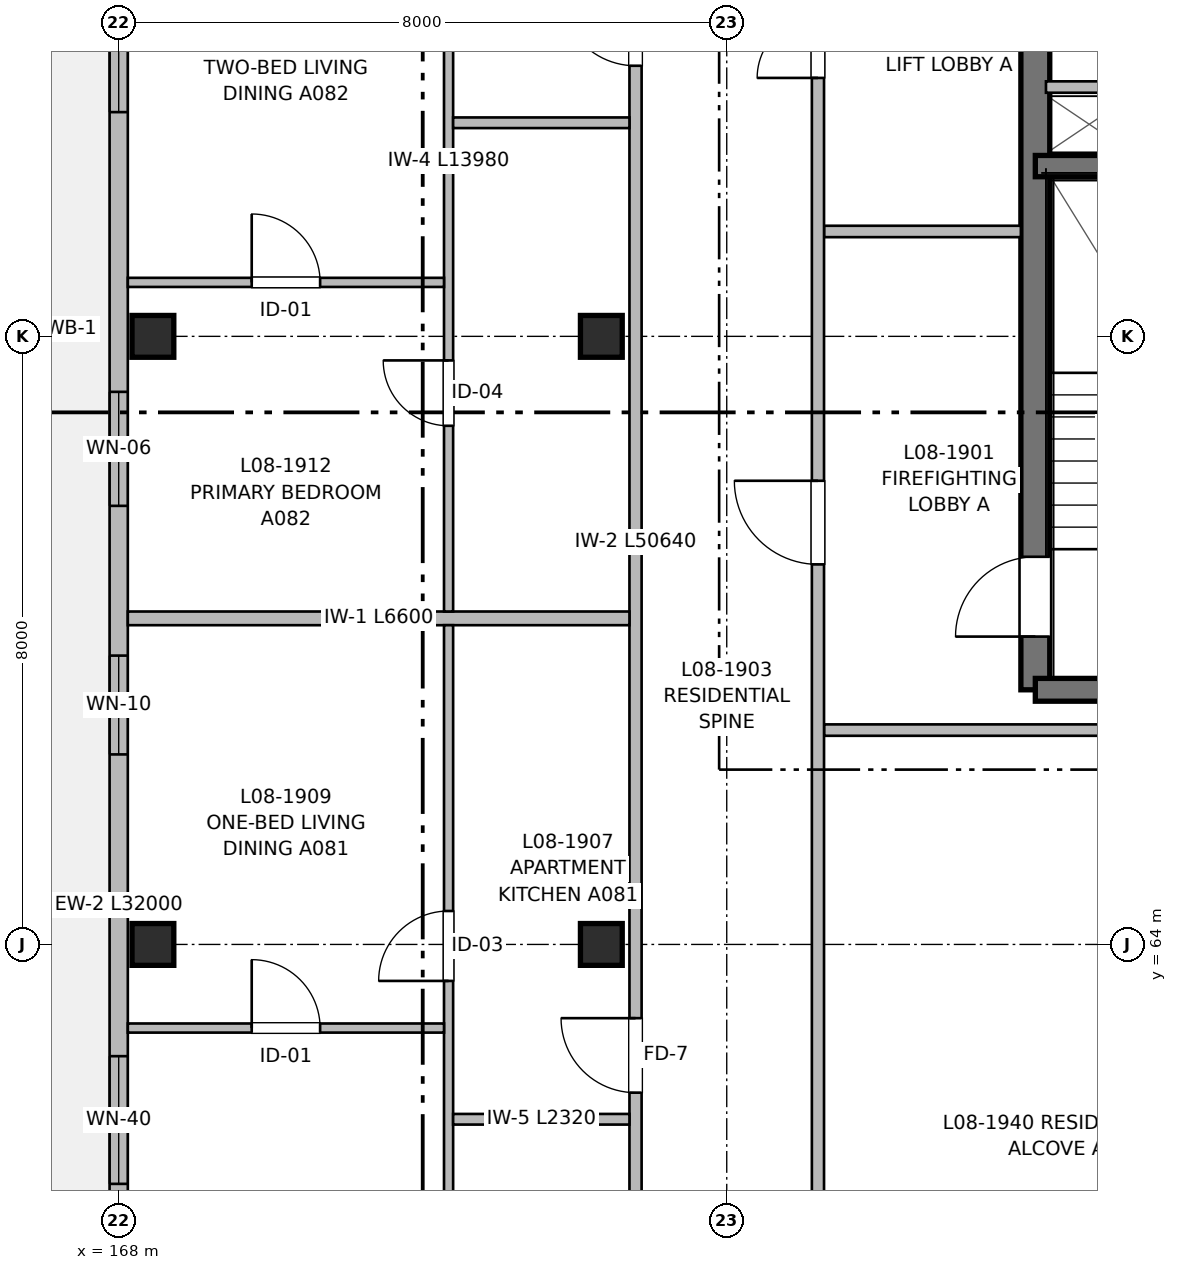
"""IFC4 building model, lengths in metres.
Left out: names, types, materials, properties, quantities, classifications, styles, units other than length and angle.
Written with IfcOpenShell. Run it as: python <this file> out.ifc"""

import sys

from ifc_helpers import new_model, si_unit, direction, frame, frame_2d, origin, origin_2d, place, context, subcontext, project, spatial, rectangle, extrude, element, fill, save


model = new_model("IFC4")
c1 = context("Model", 3, precision=1e-05, world=origin(), true_north=direction((0.0, 1.0)))
c2 = subcontext(c1, "Body", "Model", "MODEL_VIEW")
j1 = project(units=[si_unit("LENGTHUNIT", "METRE"), si_unit("PLANEANGLEUNIT", "RADIAN")], contexts=[c1])
p1 = place(None, origin())
s1 = spatial("IfcSite", under=j1, at=p1, CompositionType="ELEMENT")
p2 = place(p1, origin())
s2 = spatial("IfcBuilding", under=s1, at=p2, CompositionType="ELEMENT")
p3 = place(p2, frame((0.0, 0.0, 26.56)))
s3 = spatial("IfcBuildingStorey", under=s2, at=p3, CompositionType="ELEMENT", Elevation=26.56)
for number, where, z_axis, x_axis in (
    (1, (168.45, 64.0, 0.0), (0.0, 0.0, 1.0), (1.0, 0.0, 0.0)),
    (2, (168.45, 72.0, 0.0), (0.0, 0.0, 1.0), (1.0, 0.0, 0.0)),
    (3, (174.35, 64.0, 0.0), (0.0, 0.0, 1.0), (1.0, 0.0, 0.0)),
    (4, (174.35, 72.0, 0.0), (0.0, 0.0, 1.0), (1.0, 0.0, 0.0)),
):
    element("IfcColumn", number, at=place(p3, frame(where, z_axis=z_axis, x_axis=x_axis)), inside=s3, PredefinedType="COLUMN", context=c2, shape_type="SweptSolid", body=[
        extrude(rectangle(XDim=0.55, YDim=0.55, at=origin_2d()), origin(), (0.0, 0.0, 1.0), 3.2),
    ])
p4 = place(p3, frame((180.06, 67.35, 0.0), z_axis=(0.0, 0.0, 1.0), x_axis=(0.0, 1.0, 0.0)))
e5 = element("IfcWall", 5, at=p4, inside=s3, PredefinedType="SHEAR", context=c2, shape_type="SweptSolid", body=[
    extrude(rectangle(XDim=13.15, YDim=0.38, at=frame_2d((6.575, 0.0))), origin(), (0.0, 0.0, 1.0), 3.2),
])
p5 = place(p4, frame((0.7, 0.0, 0.0)))
e6 = element("IfcOpeningElement", 6, at=p5, cuts=e5, PredefinedType="OPENING", context=c2, shape_type="SweptSolid", body=[
    extrude(rectangle(XDim=1.05, YDim=2.15, at=frame_2d((0.525, 1.075))), frame((0.0, 0.2, 0.0), z_axis=(0.0, -1.0, 0.0), x_axis=(1.0, 0.0, 0.0)), (0.0, 0.0, 1.0), 0.4),
])
p6 = place(p3, frame((183.47, 67.35, 0.0), z_axis=(0.0, 0.0, 1.0), x_axis=(-1.0, 0.0, 0.0)))
e7 = element("IfcWall", 7, at=p6, inside=s3, PredefinedType="SHEAR", context=c2, shape_type="SweptSolid", body=[
    extrude(rectangle(XDim=3.41, YDim=0.3, at=frame_2d((1.705, 0.0))), origin(), (0.0, 0.0, 1.0), 3.2),
])
p7 = place(p3, frame((180.06, 74.24, 0.0), z_axis=(0.0, 0.0, 1.0), x_axis=(1.0, 0.0, 0.0)))
e8 = element("IfcWall", 8, at=p7, inside=s3, PredefinedType="SHEAR", context=c2, shape_type="SweptSolid", body=[
    extrude(rectangle(XDim=3.41, YDim=0.28, at=frame_2d((1.705, 0.0))), origin(), (0.0, 0.0, 1.0), 3.2),
])
p8 = place(p3, frame((180.2, 75.28, 0.0), z_axis=(0.0, 0.0, 1.0), x_axis=(1.0, 0.0, 0.0)))
e9 = element("IfcWall", 9, at=p8, inside=s3, PredefinedType="PARTITIONING", context=c2, shape_type="SweptSolid", body=[
    extrude(rectangle(XDim=1.13, YDim=0.15, at=frame_2d((0.565, 0.0))), origin(), (0.0, 0.0, 1.0), 2.95),
])
p9 = place(p3, frame((168.0, 56.0, 0.0), z_axis=(0.0, 0.0, 1.0), x_axis=(0.0, 1.0, 0.0)))
e10 = element("IfcWall", 10, at=p9, inside=s3, PredefinedType="SOLIDWALL", context=c2, shape_type="SweptSolid", body=[
    extrude(rectangle(XDim=32.0, YDim=0.24, at=frame_2d((16.0, 0.0))), origin(), (0.0, 0.0, 1.0), 2.98),
])
p10 = place(p9, frame((3.4, 0.0, 0.0)))
e11 = element("IfcOpeningElement", 11, at=p10, cuts=e10, PredefinedType="OPENING", context=c2, shape_type="SweptSolid", body=[
    extrude(rectangle(XDim=1.2, YDim=2.2, at=frame_2d((0.6, 1.1))), frame((0.0, 0.13, 0.0), z_axis=(0.0, -1.0, 0.0), x_axis=(1.0, 0.0, 0.0)), (0.0, 0.0, 1.0), 0.26),
])
p11 = place(p9, frame((4.85, 0.0, 0.72)))
e12 = element("IfcOpeningElement", 12, at=p11, cuts=e10, PredefinedType="OPENING", context=c2, shape_type="SweptSolid", body=[
    extrude(rectangle(XDim=1.68, YDim=1.5, at=frame_2d((0.84, 0.75))), frame((0.0, 0.13, 0.0), z_axis=(0.0, -1.0, 0.0), x_axis=(1.0, 0.0, 0.0)), (0.0, 0.0, 1.0), 0.26),
])
p12 = place(p9, frame((10.5, 0.0, 0.82)))
e13 = element("IfcOpeningElement", 13, at=p12, cuts=e10, PredefinedType="OPENING", context=c2, shape_type="SweptSolid", body=[
    extrude(rectangle(XDim=1.3, YDim=1.4, at=frame_2d((0.65, 0.7))), frame((0.0, 0.13, 0.0), z_axis=(0.0, -1.0, 0.0), x_axis=(1.0, 0.0, 0.0)), (0.0, 0.0, 1.0), 0.26),
])
p13 = place(p9, frame((18.95, 0.0, 0.67)))
e14 = element("IfcOpeningElement", 14, at=p13, cuts=e10, PredefinedType="OPENING", context=c2, shape_type="SweptSolid", body=[
    extrude(rectangle(XDim=2.1, YDim=1.55, at=frame_2d((1.05, 0.775))), frame((0.0, 0.13, 0.0), z_axis=(0.0, -1.0, 0.0), x_axis=(1.0, 0.0, 0.0)), (0.0, 0.0, 1.0), 0.26),
])
p14 = place(p9, frame((26.875, 0.0, 0.72)))
e15 = element("IfcOpeningElement", 15, at=p14, cuts=e10, PredefinedType="OPENING", context=c2, shape_type="SweptSolid", body=[
    extrude(rectangle(XDim=2.25, YDim=1.5, at=frame_2d((1.125, 0.75))), frame((0.0, 0.13, 0.0), z_axis=(0.0, -1.0, 0.0), x_axis=(1.0, 0.0, 0.0)), (0.0, 0.0, 1.0), 0.26),
])
p15 = place(p9, frame((13.77, 0.0, 0.82)))
e16 = element("IfcOpeningElement", 16, at=p15, cuts=e10, PredefinedType="OPENING", context=c2, shape_type="SweptSolid", body=[
    extrude(rectangle(XDim=1.5, YDim=1.4, at=frame_2d((0.75, 0.7))), frame((0.0, 0.13, 0.0), z_axis=(0.0, -1.0, 0.0), x_axis=(1.0, 0.0, 0.0)), (0.0, 0.0, 1.0), 0.26),
])
p16 = place(p9, frame((23.61, 0.0, 0.82)))
e17 = element("IfcOpeningElement", 17, at=p16, cuts=e10, PredefinedType="OPENING", context=c2, shape_type="SweptSolid", body=[
    extrude(rectangle(XDim=1.5, YDim=1.4, at=frame_2d((0.75, 0.7))), frame((0.0, 0.13, 0.0), z_axis=(0.0, -1.0, 0.0), x_axis=(1.0, 0.0, 0.0)), (0.0, 0.0, 1.0), 0.26),
])
p17 = place(p9, frame((30.89, 0.0, 0.9)))
e18 = element("IfcOpeningElement", 18, at=p17, cuts=e10, PredefinedType="OPENING", context=c2, shape_type="SweptSolid", body=[
    extrude(rectangle(XDim=0.65, YDim=0.95, at=frame_2d((0.325, 0.475))), frame((0.0, 0.13, 0.0), z_axis=(0.0, -1.0, 0.0), x_axis=(1.0, 0.0, 0.0)), (0.0, 0.0, 1.0), 0.26),
])
p18 = place(p3, frame((177.28, 66.82, 0.0), z_axis=(0.0, 0.0, 1.0), x_axis=(1.0, 0.0, 0.0)))
e19 = element("IfcWall", 19, at=p18, inside=s3, PredefinedType="PARTITIONING", context=c2, shape_type="SweptSolid", body=[
    extrude(rectangle(XDim=6.6, YDim=0.15, at=frame_2d((3.3, 0.0))), origin(), (0.0, 0.0, 1.0), 2.935),
])
p19 = place(p3, frame((177.28, 73.38, 0.0), z_axis=(0.0, 0.0, 1.0), x_axis=(1.0, 0.0, 0.0)))
e20 = element("IfcWall", 20, at=p19, inside=s3, PredefinedType="PARTITIONING", context=c2, shape_type="SweptSolid", body=[
    extrude(rectangle(XDim=2.59, YDim=0.15, at=frame_2d((1.295, 0.0))), origin(), (0.0, 0.0, 1.0), 2.935),
])
p20 = place(p3, frame((174.8, 56.16, 0.0), z_axis=(0.0, 0.0, 1.0), x_axis=(0.0, 1.0, 0.0)))
e21 = element("IfcWall", 21, at=p20, inside=s3, PredefinedType="PARTITIONING", context=c2, shape_type="SweptSolid", body=[
    extrude(rectangle(XDim=50.64, YDim=0.16, at=frame_2d((25.32, 0.0))), origin(), (0.0, 0.0, 1.0), 2.935),
])
p21 = place(p20, frame((5.89, 0.0, 0.0)))
e22 = element("IfcOpeningElement", 22, at=p21, cuts=e21, PredefinedType="OPENING", context=c2, shape_type="SweptSolid", body=[
    extrude(rectangle(XDim=0.98, YDim=2.15, at=frame_2d((0.49, 1.075))), frame((0.0, 0.09, 0.0), z_axis=(0.0, -1.0, 0.0), x_axis=(1.0, 0.0, 0.0)), (0.0, 0.0, 1.0), 0.18),
])
p22 = place(p20, frame((19.4, 0.0, 0.0)))
e23 = element("IfcOpeningElement", 23, at=p22, cuts=e21, PredefinedType="OPENING", context=c2, shape_type="SweptSolid", body=[
    extrude(rectangle(XDim=0.98, YDim=2.15, at=frame_2d((0.49, 1.075))), frame((0.0, 0.09, 0.0), z_axis=(0.0, -1.0, 0.0), x_axis=(1.0, 0.0, 0.0)), (0.0, 0.0, 1.0), 0.18),
])
p23 = place(p20, frame((33.1, 0.0, 0.0)))
e24 = element("IfcOpeningElement", 24, at=p23, cuts=e21, PredefinedType="OPENING", context=c2, shape_type="SweptSolid", body=[
    extrude(rectangle(XDim=0.98, YDim=2.15, at=frame_2d((0.49, 1.075))), frame((0.0, 0.09, 0.0), z_axis=(0.0, -1.0, 0.0), x_axis=(1.0, 0.0, 0.0)), (0.0, 0.0, 1.0), 0.18),
])
p24 = place(p20, frame((45.35, 0.0, 0.0)))
e25 = element("IfcOpeningElement", 25, at=p24, cuts=e21, PredefinedType="OPENING", context=c2, shape_type="SweptSolid", body=[
    extrude(rectangle(XDim=0.98, YDim=2.15, at=frame_2d((0.49, 1.075))), frame((0.0, 0.09, 0.0), z_axis=(0.0, -1.0, 0.0), x_axis=(1.0, 0.0, 0.0)), (0.0, 0.0, 1.0), 0.18),
])
p25 = place(p3, frame((177.2, 56.16, 0.0), z_axis=(0.0, 0.0, 1.0), x_axis=(0.0, 1.0, 0.0)))
e26 = element("IfcWall", 26, at=p25, inside=s3, PredefinedType="PARTITIONING", context=c2, shape_type="SweptSolid", body=[
    extrude(rectangle(XDim=50.64, YDim=0.16, at=frame_2d((25.32, 0.0))), origin(), (0.0, 0.0, 1.0), 2.935),
])
p26 = place(p25, frame((12.84, 0.0, 0.0)))
e27 = element("IfcOpeningElement", 27, at=p26, cuts=e26, PredefinedType="OPENING", context=c2, shape_type="SweptSolid", body=[
    extrude(rectangle(XDim=1.1, YDim=2.15, at=frame_2d((0.55, 1.075))), frame((0.0, 0.09, 0.0), z_axis=(0.0, -1.0, 0.0), x_axis=(1.0, 0.0, 0.0)), (0.0, 0.0, 1.0), 0.18),
])
p27 = place(p25, frame((19.24, 0.0, 0.0)))
e28 = element("IfcOpeningElement", 28, at=p27, cuts=e26, PredefinedType="OPENING", context=c2, shape_type="SweptSolid", body=[
    extrude(rectangle(XDim=1.6, YDim=2.15, at=frame_2d((0.8, 1.075))), frame((0.0, 0.09, 0.0), z_axis=(0.0, -1.0, 0.0), x_axis=(1.0, 0.0, 0.0)), (0.0, 0.0, 1.0), 0.18),
])
p28 = place(p25, frame((1.8, 0.0, 0.0)))
e29 = element("IfcOpeningElement", 29, at=p28, cuts=e26, PredefinedType="OPENING", context=c2, shape_type="SweptSolid", body=[
    extrude(rectangle(XDim=0.96, YDim=2.15, at=frame_2d((0.48, 1.075))), frame((0.0, 0.09, 0.0), z_axis=(0.0, -1.0, 0.0), x_axis=(1.0, 0.0, 0.0)), (0.0, 0.0, 1.0), 0.18),
])
p29 = place(p25, frame((33.17, 0.0, 0.0)))
e30 = element("IfcOpeningElement", 30, at=p29, cuts=e26, PredefinedType="OPENING", context=c2, shape_type="SweptSolid", body=[
    extrude(rectangle(XDim=0.98, YDim=2.15, at=frame_2d((0.49, 1.075))), frame((0.0, 0.09, 0.0), z_axis=(0.0, -1.0, 0.0), x_axis=(1.0, 0.0, 0.0)), (0.0, 0.0, 1.0), 0.18),
])
p30 = place(p25, frame((41.43, 0.0, 0.0)))
e31 = element("IfcOpeningElement", 31, at=p30, cuts=e26, PredefinedType="OPENING", context=c2, shape_type="SweptSolid", body=[
    extrude(rectangle(XDim=0.98, YDim=2.15, at=frame_2d((0.49, 1.075))), frame((0.0, 0.09, 0.0), z_axis=(0.0, -1.0, 0.0), x_axis=(1.0, 0.0, 0.0)), (0.0, 0.0, 1.0), 0.18),
])
p31 = place(p3, frame((168.12, 68.29, 0.0), z_axis=(0.0, 0.0, 1.0), x_axis=(1.0, 0.0, 0.0)))
e32 = element("IfcWall", 32, at=p31, inside=s3, PredefinedType="PARTITIONING", context=c2, shape_type="SweptSolid", body=[
    extrude(rectangle(XDim=6.6, YDim=0.18, at=frame_2d((3.3, 0.0))), origin(), (0.0, 0.0, 1.0), 2.935),
])
p32 = place(p3, frame((172.34, 56.16, 0.0), z_axis=(0.0, 0.0, 1.0), x_axis=(0.0, 1.0, 0.0)))
e33 = element("IfcWall", 33, at=p32, inside=s3, PredefinedType="PARTITIONING", context=c2, shape_type="SweptSolid", body=[
    extrude(rectangle(XDim=12.04, YDim=0.12, at=frame_2d((6.02, 0.0))), origin(), (0.0, 0.0, 1.0), 2.935),
])
p33 = place(p32, frame((2.105, 0.0, 0.0)))
e34 = element("IfcOpeningElement", 34, at=p33, cuts=e33, PredefinedType="OPENING", context=c2, shape_type="SweptSolid", body=[
    extrude(rectangle(XDim=0.86, YDim=2.1, at=frame_2d((0.43, 1.05))), frame((0.0, 0.07, 0.0), z_axis=(0.0, -1.0, 0.0), x_axis=(1.0, 0.0, 0.0)), (0.0, 0.0, 1.0), 0.14),
])
p34 = place(p32, frame((7.36, 0.0, 0.0)))
e35 = element("IfcOpeningElement", 35, at=p34, cuts=e33, PredefinedType="OPENING", context=c2, shape_type="SweptSolid", body=[
    extrude(rectangle(XDim=0.92, YDim=2.1, at=frame_2d((0.46, 1.05))), frame((0.0, 0.07, 0.0), z_axis=(0.0, -1.0, 0.0), x_axis=(1.0, 0.0, 0.0)), (0.0, 0.0, 1.0), 0.14),
])
p35 = place(p3, frame((172.4, 61.7, 0.0), z_axis=(0.0, 0.0, 1.0), x_axis=(1.0, 0.0, 0.0)))
e36 = element("IfcWall", 36, at=p35, inside=s3, PredefinedType="PARTITIONING", context=c2, shape_type="SweptSolid", body=[
    extrude(rectangle(XDim=2.32, YDim=0.14, at=frame_2d((1.16, 0.0))), origin(), (0.0, 0.0, 1.0), 2.935),
])
p36 = place(p3, frame((168.12, 62.9, 0.0), z_axis=(0.0, 0.0, 1.0), x_axis=(1.0, 0.0, 0.0)))
e37 = element("IfcWall", 37, at=p36, inside=s3, PredefinedType="PARTITIONING", context=c2, shape_type="SweptSolid", body=[
    extrude(rectangle(XDim=4.16, YDim=0.12, at=frame_2d((2.08, 0.0))), origin(), (0.0, 0.0, 1.0), 2.935),
])
p37 = place(p36, frame((1.63, 0.0, 0.0)))
e38 = element("IfcOpeningElement", 38, at=p37, cuts=e37, PredefinedType="OPENING", context=c2, shape_type="SweptSolid", body=[
    extrude(rectangle(XDim=0.9, YDim=2.1, at=frame_2d((0.45, 1.05))), frame((0.0, 0.07, 0.0), z_axis=(0.0, -1.0, 0.0), x_axis=(1.0, 0.0, 0.0)), (0.0, 0.0, 1.0), 0.14),
])
p38 = place(p3, frame((172.34, 68.38, 0.0), z_axis=(0.0, 0.0, 1.0), x_axis=(0.0, 1.0, 0.0)))
e39 = element("IfcWall", 39, at=p38, inside=s3, PredefinedType="PARTITIONING", context=c2, shape_type="SweptSolid", body=[
    extrude(rectangle(XDim=13.98, YDim=0.12, at=frame_2d((6.99, 0.0))), origin(), (0.0, 0.0, 1.0), 2.935),
])
p39 = place(p38, frame((2.443, 0.0, 0.0)))
e40 = element("IfcOpeningElement", 40, at=p39, cuts=e39, PredefinedType="OPENING", context=c2, shape_type="SweptSolid", body=[
    extrude(rectangle(XDim=0.86, YDim=2.1, at=frame_2d((0.43, 1.05))), frame((0.0, 0.07, 0.0), z_axis=(0.0, -1.0, 0.0), x_axis=(1.0, 0.0, 0.0)), (0.0, 0.0, 1.0), 0.14),
])
p40 = place(p38, frame((8.544, 0.0, 0.0)))
e41 = element("IfcOpeningElement", 41, at=p40, cuts=e39, PredefinedType="OPENING", context=c2, shape_type="SweptSolid", body=[
    extrude(rectangle(XDim=0.92, YDim=2.1, at=frame_2d((0.46, 1.05))), frame((0.0, 0.07, 0.0), z_axis=(0.0, -1.0, 0.0), x_axis=(1.0, 0.0, 0.0)), (0.0, 0.0, 1.0), 0.14),
])
p41 = place(p3, frame((172.4, 74.81, 0.0), z_axis=(0.0, 0.0, 1.0), x_axis=(1.0, 0.0, 0.0)))
e42 = element("IfcWall", 42, at=p41, inside=s3, PredefinedType="PARTITIONING", context=c2, shape_type="SweptSolid", body=[
    extrude(rectangle(XDim=2.32, YDim=0.14, at=frame_2d((1.16, 0.0))), origin(), (0.0, 0.0, 1.0), 2.935),
])
p42 = place(p3, frame((168.12, 72.71, 0.0), z_axis=(0.0, 0.0, 1.0), x_axis=(1.0, 0.0, 0.0)))
e43 = element("IfcWall", 43, at=p42, inside=s3, PredefinedType="PARTITIONING", context=c2, shape_type="SweptSolid", body=[
    extrude(rectangle(XDim=4.16, YDim=0.12, at=frame_2d((2.08, 0.0))), origin(), (0.0, 0.0, 1.0), 2.935),
])
p43 = place(p42, frame((1.63, 0.0, 0.0)))
e44 = element("IfcOpeningElement", 44, at=p43, cuts=e43, PredefinedType="OPENING", context=c2, shape_type="SweptSolid", body=[
    extrude(rectangle(XDim=0.9, YDim=2.1, at=frame_2d((0.45, 1.05))), frame((0.0, 0.07, 0.0), z_axis=(0.0, -1.0, 0.0), x_axis=(1.0, 0.0, 0.0)), (0.0, 0.0, 1.0), 0.14),
])
p44 = place(p5, origin())
e45 = element("IfcDoor", 45, at=p44, inside=s3, OperationType="SINGLE_SWING_LEFT", PredefinedType="DOOR", context=c2, shape_type="SweptSolid", body=[
    extrude(rectangle(XDim=1.05, YDim=2.15, at=frame_2d((0.525, 1.075))), frame((0.0, 0.025, 0.0), z_axis=(0.0, -1.0, 0.0), x_axis=(1.0, 0.0, 0.0)), (0.0, 0.0, 1.0), 0.05),
])
fill(e6, e45)
p45 = place(p11, origin())
e46 = element("IfcWindow", 46, at=p45, inside=s3, PartitioningType="SINGLE_PANEL", PredefinedType="WINDOW", context=c2, shape_type="SweptSolid", body=[
    extrude(rectangle(XDim=1.68, YDim=1.5, at=frame_2d((0.84, 0.75))), frame((0.0, 0.03, 0.0), z_axis=(0.0, -1.0, 0.0), x_axis=(1.0, 0.0, 0.0)), (0.0, 0.0, 1.0), 0.06),
])
fill(e12, e46)
p46 = place(p12, origin())
e47 = element("IfcWindow", 47, at=p46, inside=s3, PartitioningType="SINGLE_PANEL", PredefinedType="WINDOW", context=c2, shape_type="SweptSolid", body=[
    extrude(rectangle(XDim=1.3, YDim=1.4, at=frame_2d((0.65, 0.7))), frame((0.0, 0.03, 0.0), z_axis=(0.0, -1.0, 0.0), x_axis=(1.0, 0.0, 0.0)), (0.0, 0.0, 1.0), 0.06),
])
fill(e13, e47)
p47 = place(p13, origin())
e48 = element("IfcWindow", 48, at=p47, inside=s3, PartitioningType="SINGLE_PANEL", PredefinedType="WINDOW", context=c2, shape_type="SweptSolid", body=[
    extrude(rectangle(XDim=2.1, YDim=1.55, at=frame_2d((1.05, 0.775))), frame((0.0, 0.03, 0.0), z_axis=(0.0, -1.0, 0.0), x_axis=(1.0, 0.0, 0.0)), (0.0, 0.0, 1.0), 0.06),
])
fill(e14, e48)
p48 = place(p26, origin())
e49 = element("IfcDoor", 49, at=p48, inside=s3, OperationType="SINGLE_SWING_RIGHT", PredefinedType="DOOR", context=c2, shape_type="SweptSolid", body=[
    extrude(rectangle(XDim=1.1, YDim=2.15, at=frame_2d((0.55, 1.075))), frame((0.0, 0.025, 0.0), z_axis=(0.0, -1.0, 0.0), x_axis=(1.0, 0.0, 0.0)), (0.0, 0.0, 1.0), 0.05),
])
fill(e27, e49)
p49 = place(p27, origin())
e50 = element("IfcDoor", 50, at=p49, inside=s3, OperationType="DOUBLE_DOOR_SINGLE_SWING", PredefinedType="DOOR", context=c2, shape_type="SweptSolid", body=[
    extrude(rectangle(XDim=1.6, YDim=2.15, at=frame_2d((0.8, 1.075))), frame((0.0, 0.025, 0.0), z_axis=(0.0, -1.0, 0.0), x_axis=(1.0, 0.0, 0.0)), (0.0, 0.0, 1.0), 0.05),
])
fill(e28, e50)
p50 = place(p34, origin())
e51 = element("IfcDoor", 51, at=p50, inside=s3, OperationType="SINGLE_SWING_LEFT", PredefinedType="DOOR", context=c2, shape_type="SweptSolid", body=[
    extrude(rectangle(XDim=0.92, YDim=2.1, at=frame_2d((0.46, 1.05))), frame((0.0, 0.025, 0.0), z_axis=(0.0, -1.0, 0.0), x_axis=(1.0, 0.0, 0.0)), (0.0, 0.0, 1.0), 0.05),
])
fill(e35, e51)
p51 = place(p21, origin())
e52 = element("IfcDoor", 52, at=p51, inside=s3, OperationType="SINGLE_SWING_RIGHT", PredefinedType="DOOR", context=c2, shape_type="SweptSolid", body=[
    extrude(rectangle(XDim=0.98, YDim=2.15, at=frame_2d((0.49, 1.075))), frame((0.0, 0.025, 0.0), z_axis=(0.0, -1.0, 0.0), x_axis=(1.0, 0.0, 0.0)), (0.0, 0.0, 1.0), 0.05),
])
fill(e22, e52)
p52 = place(p37, origin())
e53 = element("IfcDoor", 53, at=p52, inside=s3, OperationType="SINGLE_SWING_LEFT", PredefinedType="DOOR", context=c2, shape_type="SweptSolid", body=[
    extrude(rectangle(XDim=0.9, YDim=2.1, at=frame_2d((0.45, 1.05))), frame((0.0, 0.025, 0.0), z_axis=(0.0, -1.0, 0.0), x_axis=(1.0, 0.0, 0.0)), (0.0, 0.0, 1.0), 0.05),
])
fill(e38, e53)
p53 = place(p39, origin())
e54 = element("IfcDoor", 54, at=p53, inside=s3, OperationType="SINGLE_SWING_RIGHT", PredefinedType="DOOR", context=c2, shape_type="SweptSolid", body=[
    extrude(rectangle(XDim=0.86, YDim=2.1, at=frame_2d((0.43, 1.05))), frame((0.0, 0.025, 0.0), z_axis=(0.0, -1.0, 0.0), x_axis=(1.0, 0.0, 0.0)), (0.0, 0.0, 1.0), 0.05),
])
fill(e40, e54)
p54 = place(p22, origin())
e55 = element("IfcDoor", 55, at=p54, inside=s3, OperationType="SINGLE_SWING_RIGHT", PredefinedType="DOOR", context=c2, shape_type="SweptSolid", body=[
    extrude(rectangle(XDim=0.98, YDim=2.15, at=frame_2d((0.49, 1.075))), frame((0.0, 0.025, 0.0), z_axis=(0.0, -1.0, 0.0), x_axis=(1.0, 0.0, 0.0)), (0.0, 0.0, 1.0), 0.05),
])
fill(e23, e55)
p55 = place(p43, origin())
e56 = element("IfcDoor", 56, at=p55, inside=s3, OperationType="SINGLE_SWING_LEFT", PredefinedType="DOOR", context=c2, shape_type="SweptSolid", body=[
    extrude(rectangle(XDim=0.9, YDim=2.1, at=frame_2d((0.45, 1.05))), frame((0.0, 0.025, 0.0), z_axis=(0.0, -1.0, 0.0), x_axis=(1.0, 0.0, 0.0)), (0.0, 0.0, 1.0), 0.05),
])
fill(e44, e56)
p56 = place(p15, origin())
e57 = element("IfcWindow", 57, at=p56, inside=s3, PartitioningType="SINGLE_PANEL", PredefinedType="WINDOW", context=c2, shape_type="SweptSolid", body=[
    extrude(rectangle(XDim=1.5, YDim=1.4, at=frame_2d((0.75, 0.7))), frame((0.0, 0.03, 0.0), z_axis=(0.0, -1.0, 0.0), x_axis=(1.0, 0.0, 0.0)), (0.0, 0.0, 1.0), 0.06),
])
fill(e16, e57)
save(model, sys.argv[1])
